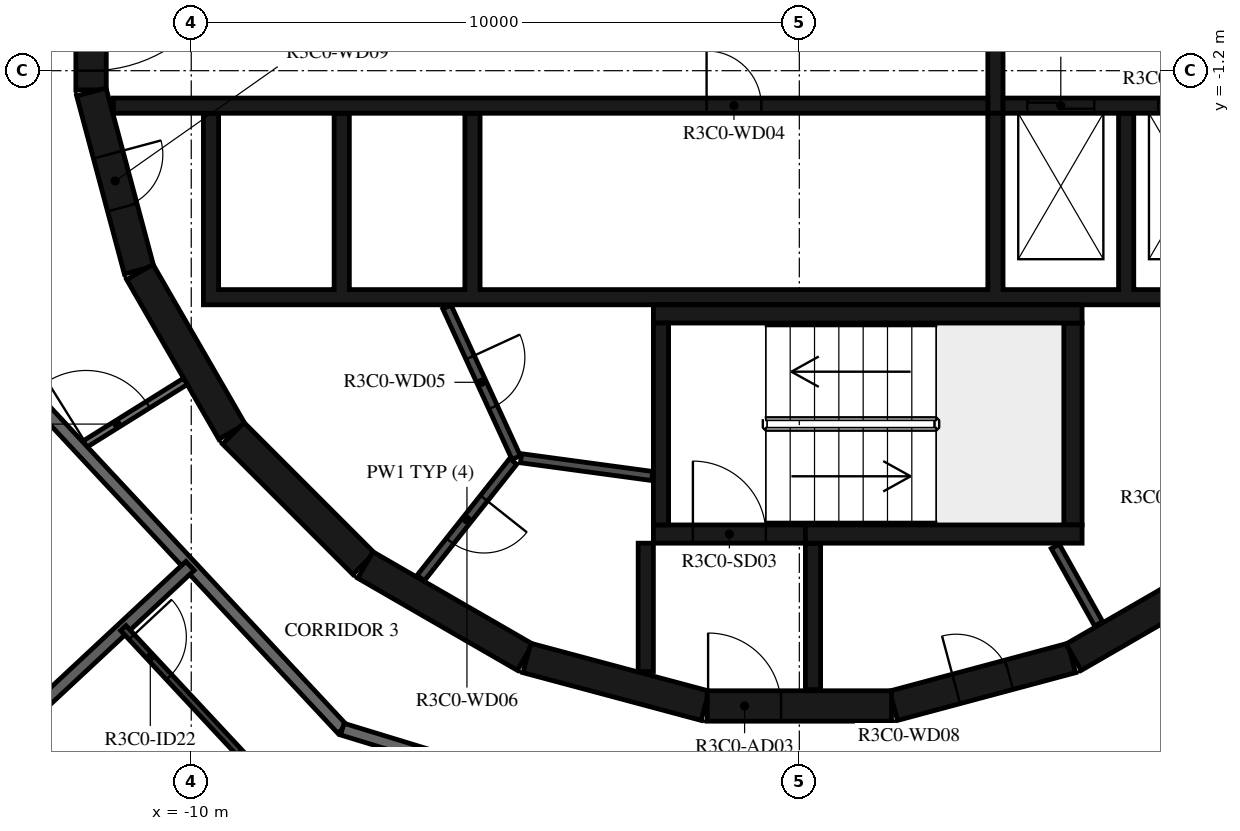
"""IFC4 building model, lengths in metres.
Left out: names, types, materials, properties, quantities, classifications, styles, units other than length and angle.
Written with IfcOpenShell. Run it as: python <this file> out.ifc"""

import sys

from ifc_helpers import new_model, si_unit, direction, frame, frame_2d, origin, place, context, subcontext, project, spatial, polyline, rectangle, outline, extrude, element, fill, save


model = new_model("IFC4")
c1 = context("Model", 3, precision=1e-05, world=origin(), true_north=direction((0.0, 1.0)))
c2 = subcontext(c1, "Body", "Model", "MODEL_VIEW")
j1 = project(units=[si_unit("LENGTHUNIT", "METRE"), si_unit("PLANEANGLEUNIT", "RADIAN")], contexts=[c1])
p1 = place(None, origin())
s1 = spatial("IfcSite", under=j1, at=p1, CompositionType="ELEMENT")
p2 = place(p1, origin())
s2 = spatial("IfcBuilding", under=s1, at=p2, CompositionType="ELEMENT")
p3 = place(p2, frame((0.0, 0.0, 134.4)))
s3 = spatial("IfcBuildingStorey", under=s2, at=p3, CompositionType="ELEMENT", Elevation=134.4)
p4 = place(p3, frame((1.55, -11.643, 0.0), z_axis=(0.0, 0.0, 1.0), x_axis=(0.965948410781, 0.258734743916, 0.0)))
e1 = element("IfcWall", 1, at=p4, inside=s3, PredefinedType="SHEAR", context=c2, shape_type="SweptSolid", body=[
    extrude(rectangle(XDim=3.033, YDim=0.5, at=frame_2d((1.516, 0.0))), origin(), (0.0, 0.0, 1.0), 3.12),
])
p5 = place(p4, frame((1.066, 0.0, 0.0)))
e2 = element("IfcOpeningElement", 2, at=p5, cuts=e1, PredefinedType="OPENING", context=c2, shape_type="SweptSolid", body=[
    extrude(rectangle(XDim=0.9, YDim=2.1, at=frame_2d((0.45, 1.05))), frame((0.0, 0.26, 0.0), z_axis=(0.0, -1.0, 0.0), x_axis=(1.0, 0.0, 0.0)), (0.0, 0.0, 1.0), 0.52),
])
p6 = place(p3, frame((4.51, -10.845, 0.0), z_axis=(0.0, 0.0, 1.0), x_axis=(0.865975092491, 0.500087131594, 0.0)))
e3 = element("IfcWall", 3, at=p6, inside=s3, PredefinedType="SHEAR", context=c2, shape_type="SweptSolid", body=[
    extrude(rectangle(XDim=3.033, YDim=0.5, at=frame_2d((1.516, 0.0))), origin(), (0.0, 0.0, 1.0), 3.12),
])
p7 = place(p3, frame((-11.647, 1.516, 0.0), z_axis=(0.0, 0.0, 1.0), x_axis=(0.0, -1.0, 0.0)))
e4 = element("IfcWall", 4, at=p7, inside=s3, PredefinedType="SHEAR", context=c2, shape_type="SweptSolid", body=[
    extrude(rectangle(XDim=3.033, YDim=0.5, at=frame_2d((1.516, 0.0))), origin(), (0.0, 0.0, 1.0), 3.12),
])
p8 = place(p7, frame((0.316, 0.0, 0.0)))
e5 = element("IfcOpeningElement", 5, at=p8, cuts=e4, PredefinedType="OPENING", context=c2, shape_type="SweptSolid", body=[
    extrude(rectangle(XDim=2.4, YDim=2.1, at=frame_2d((1.2, 1.05))), frame((0.0, 0.26, 0.0), z_axis=(0.0, -1.0, 0.0), x_axis=(1.0, 0.0, 0.0)), (0.0, 0.0, 1.0), 0.52),
])
p9 = place(p3, frame((-11.643, -1.55, 0.0), z_axis=(0.0, 0.0, 1.0), x_axis=(0.258734743916, -0.965948410781, 0.0)))
e6 = element("IfcWall", 6, at=p9, inside=s3, PredefinedType="SHEAR", context=c2, shape_type="SweptSolid", body=[
    extrude(rectangle(XDim=3.033, YDim=0.5, at=frame_2d((1.516, 0.0))), origin(), (0.0, 0.0, 1.0), 3.12),
])
p10 = place(p9, frame((1.066, 0.0, 0.0)))
e7 = element("IfcOpeningElement", 7, at=p10, cuts=e6, PredefinedType="OPENING", context=c2, shape_type="SweptSolid", body=[
    extrude(rectangle(XDim=0.9, YDim=2.1, at=frame_2d((0.45, 1.05))), frame((0.0, 0.26, 0.0), z_axis=(0.0, -1.0, 0.0), x_axis=(1.0, 0.0, 0.0)), (0.0, 0.0, 1.0), 0.52),
])
p11 = place(p3, frame((-10.845, -4.51, 0.0), z_axis=(0.0, 0.0, 1.0), x_axis=(0.500087131594, -0.865975092491, 0.0)))
e8 = element("IfcWall", 8, at=p11, inside=s3, PredefinedType="SHEAR", context=c2, shape_type="SweptSolid", body=[
    extrude(rectangle(XDim=3.033, YDim=0.5, at=frame_2d((1.516, 0.0))), origin(), (0.0, 0.0, 1.0), 3.12),
])
p12 = place(p3, frame((-9.308, -7.164, 0.0), z_axis=(0.0, 0.0, 1.0), x_axis=(0.707106781187, -0.707106781187, 0.0)))
e9 = element("IfcWall", 9, at=p12, inside=s3, PredefinedType="SHEAR", context=c2, shape_type="SweptSolid", body=[
    extrude(rectangle(XDim=3.032, YDim=0.5, at=frame_2d((1.516, 0.0))), origin(), (0.0, 0.0, 1.0), 3.12),
])
for number, where, z_axis, x_axis in (
    (10, (-7.137, -9.329, 0.0), (0.0, 0.0, 1.0), (0.866, -0.5, 0.0)),
    (11, (-4.479, -10.858, 0.0), (0.0, 0.0, 1.0), (0.966, -0.259, 0.0)),
):
    element("IfcWall", number, at=place(p3, frame(where, z_axis=z_axis, x_axis=x_axis)), inside=s3, PredefinedType="SHEAR", context=c2, shape_type="SweptSolid", body=[
        extrude(rectangle(XDim=3.033, YDim=0.5, at=frame_2d((1.516, 0.0))), origin(), (0.0, 0.0, 1.0), 3.12),
    ])
p13 = place(p3, frame((-1.516, -11.647, 0.0), z_axis=(0.0, 0.0, 1.0), x_axis=(1.0, 0.0, 0.0)))
e12 = element("IfcWall", 12, at=p13, inside=s3, PredefinedType="SHEAR", context=c2, shape_type="SweptSolid", body=[
    extrude(rectangle(XDim=3.033, YDim=0.5, at=frame_2d((1.516, 0.0))), origin(), (0.0, 0.0, 1.0), 3.12),
])
p14 = place(p13, frame((0.016, 0.0, 0.0)))
e13 = element("IfcOpeningElement", 13, at=p14, cuts=e12, PredefinedType="OPENING", context=c2, shape_type="SweptSolid", body=[
    extrude(rectangle(XDim=1.2, YDim=2.1, at=frame_2d((0.6, 1.05))), frame((0.0, 0.26, 0.0), z_axis=(0.0, -1.0, 0.0), x_axis=(1.0, 0.0, 0.0)), (0.0, 0.0, 1.0), 0.52),
])
p15 = place(p3, frame((-2.275, -8.67, 0.0), z_axis=(0.0, 0.0, 1.0), x_axis=(0.0, 1.0, 0.0)))
e14 = element("IfcWall", 14, at=p15, inside=s3, PredefinedType="SHEAR", context=c2, shape_type="SweptSolid", body=[
    extrude(rectangle(XDim=3.32, YDim=0.25, at=frame_2d((1.66, 0.0))), origin(), (0.0, 0.0, 1.0), 3.12),
])
p16 = place(p3, frame((-2.4, -5.2, 0.0), z_axis=(0.0, 0.0, 1.0), x_axis=(1.0, 0.0, 0.0)))
e15 = element("IfcWall", 15, at=p16, inside=s3, PredefinedType="SHEAR", context=c2, shape_type="SweptSolid", body=[
    extrude(rectangle(XDim=7.05, YDim=0.3, at=frame_2d((3.525, 0.0))), origin(), (0.0, 0.0, 1.0), 3.12),
])
p17 = place(p3, frame((4.5, -8.67, 0.0), z_axis=(0.0, 0.0, 1.0), x_axis=(0.0, 1.0, 0.0)))
e16 = element("IfcWall", 16, at=p17, inside=s3, PredefinedType="SHEAR", context=c2, shape_type="SweptSolid", body=[
    extrude(rectangle(XDim=3.32, YDim=0.3, at=frame_2d((1.66, 0.0))), origin(), (0.0, 0.0, 1.0), 3.12),
])
p18 = place(p3, frame((0.1, -8.82, 0.0), z_axis=(0.0, 0.0, 1.0), x_axis=(1.0, 0.0, 0.0)))
e17 = element("IfcWall", 17, at=p18, inside=s3, PredefinedType="SHEAR", context=c2, shape_type="SweptSolid", body=[
    extrude(rectangle(XDim=4.55, YDim=0.3, at=frame_2d((2.275, 0.0))), origin(), (0.0, 0.0, 1.0), 3.12),
])
p19 = place(p3, frame((-2.4, -8.82, 0.0), z_axis=(0.0, 0.0, 1.0), x_axis=(1.0, 0.0, 0.0)))
e18 = element("IfcWall", 18, at=p19, inside=s3, PredefinedType="SHEAR", context=c2, shape_type="SweptSolid", body=[
    extrude(rectangle(XDim=2.5, YDim=0.3, at=frame_2d((1.25, 0.0))), origin(), (0.0, 0.0, 1.0), 3.12),
])
p20 = place(p19, frame((0.65, 0.0, 0.0)))
e19 = element("IfcOpeningElement", 19, at=p20, cuts=e18, PredefinedType="OPENING", context=c2, shape_type="SweptSolid", body=[
    extrude(rectangle(XDim=1.2, YDim=2.1, at=frame_2d((0.6, 1.05))), frame((0.0, 0.16, 0.0), z_axis=(0.0, -1.0, 0.0), x_axis=(1.0, 0.0, 0.0)), (0.0, 0.0, 1.0), 0.32),
])
p21 = place(p3, frame((-2.525, -8.97, 0.0), z_axis=(0.0, 0.0, 1.0), x_axis=(0.0, -1.0, 0.0)))
e20 = element("IfcWall", 20, at=p21, inside=s3, PredefinedType="SHEAR", context=c2, shape_type="SweptSolid", body=[
    extrude(rectangle(XDim=2.11, YDim=0.25, at=frame_2d((1.055, 0.0))), origin(), (0.0, 0.0, 1.0), 3.12),
])
p22 = place(p3, frame((0.225, -8.97, 0.0), z_axis=(0.0, 0.0, 1.0), x_axis=(0.0, -1.0, 0.0)))
e21 = element("IfcWall", 21, at=p22, inside=s3, PredefinedType="SHEAR", context=c2, shape_type="SweptSolid", body=[
    extrude(rectangle(XDim=2.41, YDim=0.25, at=frame_2d((1.205, 0.0))), origin(), (0.0, 0.0, 1.0), 3.12),
])
p23 = place(p3, origin())
e22 = element("IfcWall", 22, at=p23, inside=s3, PredefinedType="SHEAR", context=c2, shape_type="SweptSolid", body=[
    extrude(outline(polyline([(9.8, -5.05), (9.8, -4.8), (9.8, -1.9), (9.55, -1.9), (9.55, -4.8), (7.65, -4.8), (7.65, -1.9), (7.4, -1.9), (7.4, -4.8), (5.5, -4.8), (5.5, -1.9), (5.25, -1.9), (5.25, -4.8), (3.35, -4.8), (3.35, -1.9), (3.1, -1.9), (3.1, -4.8), (-5.25, -4.8), (-5.25, -1.9), (-5.5, -1.9), (-5.5, -4.8), (-7.4, -4.8), (-7.4, -1.9), (-7.65, -1.9), (-7.65, -4.8), (-9.55, -4.8), (-9.55, -1.9), (-9.8, -1.9), (-9.8, -4.8), (-9.8, -5.05), (9.8, -5.05)])), origin(), (0.0, 0.0, 1.0), 3.12),
])
p24 = place(p3, frame((-11.28, -1.775, 0.0), z_axis=(0.0, 0.0, 1.0), x_axis=(1.0, 0.0, 0.0)))
e23 = element("IfcWall", 23, at=p24, inside=s3, PredefinedType="SHEAR", context=c2, shape_type="SweptSolid", body=[
    extrude(rectangle(XDim=14.38, YDim=0.25, at=frame_2d((7.19, 0.0))), origin(), (0.0, 0.0, 1.0), 3.12),
])
p25 = place(p24, frame((9.755, 0.0, 0.0)))
e24 = element("IfcOpeningElement", 24, at=p25, cuts=e23, PredefinedType="OPENING", context=c2, shape_type="SweptSolid", body=[
    extrude(rectangle(XDim=0.9, YDim=2.1, at=frame_2d((0.45, 1.05))), frame((0.0, 0.135, 0.0), z_axis=(0.0, -1.0, 0.0), x_axis=(1.0, 0.0, 0.0)), (0.0, 0.0, 1.0), 0.27),
])
p26 = place(p3, frame((3.35, -1.775, 0.0), z_axis=(0.0, 0.0, 1.0), x_axis=(1.0, 0.0, 0.0)))
e25 = element("IfcWall", 25, at=p26, inside=s3, PredefinedType="SHEAR", context=c2, shape_type="SweptSolid", body=[
    extrude(rectangle(XDim=7.93, YDim=0.25, at=frame_2d((3.965, 0.0))), origin(), (0.0, 0.0, 1.0), 3.12),
])
p27 = place(p26, frame((0.4, 0.0, 0.0)))
e26 = element("IfcOpeningElement", 26, at=p27, cuts=e25, PredefinedType="OPENING", context=c2, shape_type="SweptSolid", body=[
    extrude(rectangle(XDim=1.1, YDim=2.4, at=frame_2d((0.55, 1.2))), frame((0.0, 0.135, 0.0), z_axis=(0.0, -1.0, 0.0), x_axis=(1.0, 0.0, 0.0)), (0.0, 0.0, 1.0), 0.27),
])
p28 = place(p26, frame((2.55, 0.0, 0.0)))
e27 = element("IfcOpeningElement", 27, at=p28, cuts=e25, PredefinedType="OPENING", context=c2, shape_type="SweptSolid", body=[
    extrude(rectangle(XDim=1.1, YDim=2.4, at=frame_2d((0.55, 1.2))), frame((0.0, 0.135, 0.0), z_axis=(0.0, -1.0, 0.0), x_axis=(1.0, 0.0, 0.0)), (0.0, 0.0, 1.0), 0.27),
])
p29 = place(p26, frame((4.7, 0.0, 0.0)))
e28 = element("IfcOpeningElement", 28, at=p29, cuts=e25, PredefinedType="OPENING", context=c2, shape_type="SweptSolid", body=[
    extrude(rectangle(XDim=1.1, YDim=2.4, at=frame_2d((0.55, 1.2))), frame((0.0, 0.135, 0.0), z_axis=(0.0, -1.0, 0.0), x_axis=(1.0, 0.0, 0.0)), (0.0, 0.0, 1.0), 0.27),
])
p30 = place(p3, frame((3.225, -1.9, 0.0), z_axis=(0.0, 0.0, 1.0), x_axis=(0.0, 1.0, 0.0)))
e29 = element("IfcWall", 29, at=p30, inside=s3, PredefinedType="SHEAR", context=c2, shape_type="SweptSolid", body=[
    extrude(rectangle(XDim=3.8, YDim=0.25, at=frame_2d((1.9, 0.0))), origin(), (0.0, 0.0, 1.0), 3.12),
])
p31 = place(p3, frame((4.922, -10.296, 0.0), z_axis=(0.0, 0.0, 1.0), x_axis=(-0.48860846254, 0.872503163509, 0.0)))
e30 = element("IfcWall", 30, at=p31, inside=s3, PredefinedType="PARTITIONING", context=c2, shape_type="SweptSolid", body=[
    extrude(rectangle(XDim=1.459, YDim=0.15, at=frame_2d((0.73, 0.0))), origin(), (0.0, 0.0, 1.0), 3.12),
])
p32 = place(p3, frame((-5.795, -5.086, 0.0), z_axis=(0.0, 0.0, 1.0), x_axis=(0.417887867606, -0.908498613157, 0.0)))
e31 = element("IfcWall", 31, at=p32, inside=s3, PredefinedType="PARTITIONING", context=c2, shape_type="SweptSolid", body=[
    extrude(rectangle(XDim=2.726, YDim=0.15, at=frame_2d((1.363, 0.0))), origin(), (0.0, 0.0, 1.0), 3.12),
])
p33 = place(p32, frame((0.913, 0.0, 0.0)))
e32 = element("IfcOpeningElement", 32, at=p33, cuts=e31, PredefinedType="OPENING", context=c2, shape_type="SweptSolid", body=[
    extrude(rectangle(XDim=0.9, YDim=2.1, at=frame_2d((0.45, 1.05))), frame((0.0, 0.085, 0.0), z_axis=(0.0, -1.0, 0.0), x_axis=(1.0, 0.0, 0.0)), (0.0, 0.0, 1.0), 0.17),
])
p34 = place(p3, frame((-4.706, -7.625, 0.0), z_axis=(0.0, 0.0, 1.0), x_axis=(-0.621392599334, -0.783499353856, 0.0)))
e33 = element("IfcWall", 33, at=p34, inside=s3, PredefinedType="PARTITIONING", context=c2, shape_type="SweptSolid", body=[
    extrude(rectangle(XDim=2.447, YDim=0.15, at=frame_2d((1.224, 0.0))), origin(), (0.0, 0.0, 1.0), 3.12),
])
p35 = place(p34, frame((0.774, 0.0, 0.0)))
e34 = element("IfcOpeningElement", 34, at=p35, cuts=e33, PredefinedType="OPENING", context=c2, shape_type="SweptSolid", body=[
    extrude(rectangle(XDim=0.9, YDim=2.1, at=frame_2d((0.45, 1.05))), frame((0.0, 0.085, 0.0), z_axis=(0.0, -1.0, 0.0), x_axis=(1.0, 0.0, 0.0)), (0.0, 0.0, 1.0), 0.17),
])
p36 = place(p3, frame((-2.42, -7.865, 0.0), z_axis=(0.0, 0.0, 1.0), x_axis=(-0.990972299108, 0.134066783362, 0.0)))
e35 = element("IfcWall", 35, at=p36, inside=s3, PredefinedType="PARTITIONING", context=c2, shape_type="SweptSolid", body=[
    extrude(rectangle(XDim=2.176, YDim=0.15, at=frame_2d((1.088, 0.0))), origin(), (0.0, 0.0, 1.0), 3.12),
])
p37 = place(p3, frame((-11.836, -7.396, 0.0), z_axis=(0.0, 0.0, 1.0), x_axis=(0.848071831599, 0.529881277692, 0.0)))
e36 = element("IfcWall", 36, at=p37, inside=s3, PredefinedType="PARTITIONING", context=c2, shape_type="SweptSolid", body=[
    extrude(rectangle(XDim=2.052, YDim=0.12, at=frame_2d((1.026, 0.0))), origin(), (0.0, 0.0, 1.0), 3.12),
])
p38 = place(p37, frame((0.125, 0.0, 0.0)))
e37 = element("IfcOpeningElement", 37, at=p38, cuts=e36, PredefinedType="OPENING", context=c2, shape_type="SweptSolid", body=[
    extrude(rectangle(XDim=1.2, YDim=2.1, at=frame_2d((0.6, 1.05))), frame((0.0, 0.07, 0.0), z_axis=(0.0, -1.0, 0.0), x_axis=(1.0, 0.0, 0.0)), (0.0, 0.0, 1.0), 0.14),
])
p39 = place(p3, frame((-12.523, -6.659, 0.0), z_axis=(0.0, 0.0, 1.0), x_axis=(0.682001841105, -0.731350455479, 0.0)))
e38 = element("IfcWall", 38, at=p39, inside=s3, PredefinedType="STANDARD", context=c2, shape_type="SweptSolid", body=[
    extrude(rectangle(XDim=7.342, YDim=0.2, at=frame_2d((3.671, 0.0))), origin(), (0.0, 0.0, 1.0), 3.12),
])
p40 = place(p3, frame((-7.516, -12.028, 0.0), z_axis=(0.0, 0.0, 1.0), x_axis=(0.956306642771, -0.292365533182, 0.0)))
e39 = element("IfcWall", 39, at=p40, inside=s3, PredefinedType="STANDARD", context=c2, shape_type="SweptSolid", body=[
    extrude(rectangle(XDim=7.342, YDim=0.2, at=frame_2d((3.671, 0.0))), origin(), (0.0, 0.0, 1.0), 3.12),
])
p41 = place(p40, frame((5.745, 0.0, 0.0)))
e40 = element("IfcOpeningElement", 40, at=p41, cuts=e39, PredefinedType="OPENING", context=c2, shape_type="SweptSolid", body=[
    extrude(rectangle(XDim=1.0, YDim=2.1, at=frame_2d((0.5, 1.05))), frame((0.0, 0.11, 0.0), z_axis=(0.0, -1.0, 0.0), x_axis=(1.0, 0.0, 0.0)), (0.0, 0.0, 1.0), 0.22),
])
p42 = place(p3, frame((-13.699, -12.774, 0.0), z_axis=(0.0, 0.0, 1.0), x_axis=(0.731353758457, 0.681998299111, 0.0)))
e41 = element("IfcWall", 41, at=p42, inside=s3, PredefinedType="STANDARD", context=c2, shape_type="SweptSolid", body=[
    extrude(rectangle(XDim=5.031, YDim=0.2, at=frame_2d((2.515, 0.0))), origin(), (0.0, 0.0, 1.0), 3.12),
])
p43 = place(p3, frame((-11.117, -10.366, 0.0), z_axis=(0.0, 0.0, 1.0), x_axis=(0.682029016154, -0.73132511315, 0.0)))
e42 = element("IfcWall", 42, at=p43, inside=s3, PredefinedType="PARTITIONING", context=c2, shape_type="SweptSolid", body=[
    extrude(rectangle(XDim=2.858, YDim=0.12, at=frame_2d((1.429, 0.0))), origin(), (0.0, 0.0, 1.0), 3.12),
])
p44 = place(p43, frame((0.2, 0.0, 0.0)))
e43 = element("IfcOpeningElement", 43, at=p44, cuts=e42, PredefinedType="OPENING", context=c2, shape_type="SweptSolid", body=[
    extrude(rectangle(XDim=0.9, YDim=2.1, at=frame_2d((0.45, 1.05))), frame((0.0, 0.07, 0.0), z_axis=(0.0, -1.0, 0.0), x_axis=(1.0, 0.0, 0.0)), (0.0, 0.0, 1.0), 0.14),
])
p45 = place(p20, origin())
e44 = element("IfcDoor", 44, at=p45, inside=s3, OperationType="SINGLE_SWING_LEFT", PredefinedType="DOOR", context=c2, shape_type="SweptSolid", body=[
    extrude(rectangle(XDim=1.2, YDim=2.1, at=frame_2d((0.6, 1.05))), frame((0.0, 0.025, 0.0), z_axis=(0.0, -1.0, 0.0), x_axis=(1.0, 0.0, 0.0)), (0.0, 0.0, 1.0), 0.05),
])
fill(e19, e44)
p46 = place(p14, origin())
e45 = element("IfcDoor", 45, at=p46, inside=s3, OperationType="SINGLE_SWING_RIGHT", PredefinedType="DOOR", context=c2, shape_type="SweptSolid", body=[
    extrude(rectangle(XDim=1.2, YDim=2.1, at=frame_2d((0.6, 1.05))), frame((0.0, 0.025, 0.0), z_axis=(0.0, -1.0, 0.0), x_axis=(1.0, 0.0, 0.0)), (0.0, 0.0, 1.0), 0.05),
])
fill(e13, e45)
p47 = place(p8, origin())
e46 = element("IfcDoor", 46, at=p47, inside=s3, OperationType="DOUBLE_DOOR_SINGLE_SWING", PredefinedType="DOOR", context=c2, shape_type="SweptSolid", body=[
    extrude(rectangle(XDim=2.4, YDim=2.1, at=frame_2d((1.2, 1.05))), frame((0.0, 0.025, 0.0), z_axis=(0.0, -1.0, 0.0), x_axis=(1.0, 0.0, 0.0)), (0.0, 0.0, 1.0), 0.05),
])
fill(e5, e46)
p48 = place(p27, origin())
e47 = element("IfcDoor", 47, at=p48, inside=s3, OperationType="DOUBLE_DOOR_SLIDING", PredefinedType="DOOR", context=c2, shape_type="SweptSolid", body=[
    extrude(rectangle(XDim=1.1, YDim=2.4, at=frame_2d((0.55, 1.2))), frame((0.0, 0.025, 0.0), z_axis=(0.0, -1.0, 0.0), x_axis=(1.0, 0.0, 0.0)), (0.0, 0.0, 1.0), 0.05),
])
fill(e26, e47)
p49 = place(p28, origin())
e48 = element("IfcDoor", 48, at=p49, inside=s3, OperationType="DOUBLE_DOOR_SLIDING", PredefinedType="DOOR", context=c2, shape_type="SweptSolid", body=[
    extrude(rectangle(XDim=1.1, YDim=2.4, at=frame_2d((0.55, 1.2))), frame((0.0, 0.025, 0.0), z_axis=(0.0, -1.0, 0.0), x_axis=(1.0, 0.0, 0.0)), (0.0, 0.0, 1.0), 0.05),
])
fill(e27, e48)
p50 = place(p25, origin())
e49 = element("IfcDoor", 49, at=p50, inside=s3, OperationType="SINGLE_SWING_LEFT", PredefinedType="DOOR", context=c2, shape_type="SweptSolid", body=[
    extrude(rectangle(XDim=0.9, YDim=2.1, at=frame_2d((0.45, 1.05))), frame((0.0, 0.025, 0.0), z_axis=(0.0, -1.0, 0.0), x_axis=(1.0, 0.0, 0.0)), (0.0, 0.0, 1.0), 0.05),
])
fill(e24, e49)
p51 = place(p33, origin())
e50 = element("IfcDoor", 50, at=p51, inside=s3, OperationType="SINGLE_SWING_RIGHT", PredefinedType="DOOR", context=c2, shape_type="SweptSolid", body=[
    extrude(rectangle(XDim=0.9, YDim=2.1, at=frame_2d((0.45, 1.05))), frame((0.0, 0.025, 0.0), z_axis=(0.0, -1.0, 0.0), x_axis=(1.0, 0.0, 0.0)), (0.0, 0.0, 1.0), 0.05),
])
fill(e32, e50)
p52 = place(p35, origin())
e51 = element("IfcDoor", 51, at=p52, inside=s3, OperationType="SINGLE_SWING_LEFT", PredefinedType="DOOR", context=c2, shape_type="SweptSolid", body=[
    extrude(rectangle(XDim=0.9, YDim=2.1, at=frame_2d((0.45, 1.05))), frame((0.0, 0.025, 0.0), z_axis=(0.0, -1.0, 0.0), x_axis=(1.0, 0.0, 0.0)), (0.0, 0.0, 1.0), 0.05),
])
fill(e34, e51)
p53 = place(p5, origin())
e52 = element("IfcDoor", 52, at=p53, inside=s3, OperationType="SINGLE_SWING_LEFT", PredefinedType="DOOR", context=c2, shape_type="SweptSolid", body=[
    extrude(rectangle(XDim=0.9, YDim=2.1, at=frame_2d((0.45, 1.05))), frame((0.0, 0.025, 0.0), z_axis=(0.0, -1.0, 0.0), x_axis=(1.0, 0.0, 0.0)), (0.0, 0.0, 1.0), 0.05),
])
fill(e2, e52)
p54 = place(p10, origin())
e53 = element("IfcDoor", 53, at=p54, inside=s3, OperationType="SINGLE_SWING_RIGHT", PredefinedType="DOOR", context=c2, shape_type="SweptSolid", body=[
    extrude(rectangle(XDim=0.9, YDim=2.1, at=frame_2d((0.45, 1.05))), frame((0.0, 0.025, 0.0), z_axis=(0.0, -1.0, 0.0), x_axis=(1.0, 0.0, 0.0)), (0.0, 0.0, 1.0), 0.05),
])
fill(e7, e53)
p55 = place(p44, origin())
e54 = element("IfcDoor", 54, at=p55, inside=s3, OperationType="SINGLE_SWING_LEFT", PredefinedType="DOOR", context=c2, shape_type="SweptSolid", body=[
    extrude(rectangle(XDim=0.9, YDim=2.1, at=frame_2d((0.45, 1.05))), frame((0.0, 0.025, 0.0), z_axis=(0.0, -1.0, 0.0), x_axis=(1.0, 0.0, 0.0)), (0.0, 0.0, 1.0), 0.05),
])
fill(e43, e54)
p56 = place(p38, origin())
e55 = element("IfcDoor", 55, at=p56, inside=s3, OperationType="DOUBLE_DOOR_SINGLE_SWING", PredefinedType="DOOR", context=c2, shape_type="SweptSolid", body=[
    extrude(rectangle(XDim=1.2, YDim=2.1, at=frame_2d((0.6, 1.05))), frame((0.0, 0.025, 0.0), z_axis=(0.0, -1.0, 0.0), x_axis=(1.0, 0.0, 0.0)), (0.0, 0.0, 1.0), 0.05),
])
fill(e37, e55)
save(model, sys.argv[1])
